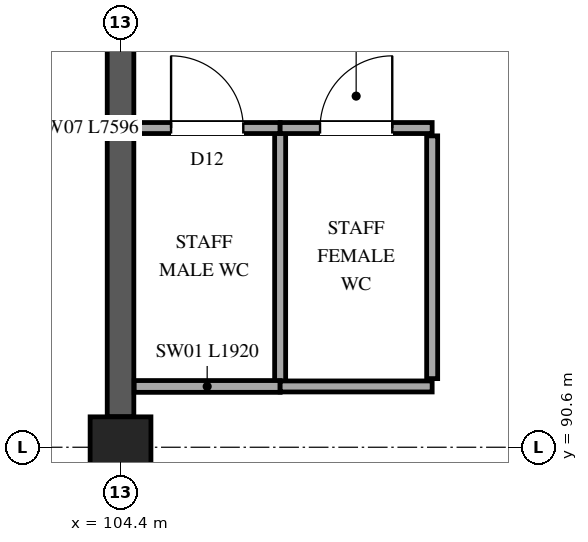
"""IFC4 building model, lengths in metres.
Left out: names, types, materials, properties, quantities, classifications, styles, units other than length and angle.
Written with IfcOpenShell. Run it as: python <this file> out.ifc"""

import sys

from ifc_helpers import new_model, si_unit, direction, frame, frame_2d, origin, origin_2d, place, context, subcontext, project, spatial, rectangle, extrude, element, fill, save


model = new_model("IFC4")
c1 = context("Model", 3, precision=1e-05, world=origin(), true_north=direction((0.0, 1.0)))
c2 = subcontext(c1, "Body", "Model", "MODEL_VIEW")
j1 = project(units=[si_unit("LENGTHUNIT", "METRE"), si_unit("PLANEANGLEUNIT", "RADIAN")], contexts=[c1])
p1 = place(None, origin())
s1 = spatial("IfcSite", under=j1, at=p1, CompositionType="ELEMENT")
p2 = place(p1, origin())
s2 = spatial("IfcBuilding", under=s1, at=p2, CompositionType="ELEMENT")
p3 = place(p2, frame((0.0, 0.0, 21.6)))
s3 = spatial("IfcBuildingStorey", under=s2, at=p3, CompositionType="ELEMENT", Elevation=21.6)
p4 = place(p3, frame((104.4, 90.6, 0.0), z_axis=(0.0, 0.0, 1.0), x_axis=(1.0, 0.0, 0.0)))
e1 = element("IfcColumn", 1, at=p4, inside=s3, PredefinedType="COLUMN", context=c2, shape_type="SweptSolid", body=[
    extrude(rectangle(XDim=0.8, YDim=0.8, at=origin_2d()), origin(), (0.0, 0.0, 1.0), 5.1),
])
p5 = place(p3, frame((104.4, 91.002, 0.0), z_axis=(0.0, 0.0, 1.0), x_axis=(0.0, 1.0, 0.0)))
e2 = element("IfcWall", 2, at=p5, inside=s3, PredefinedType="STANDARD", context=c2, shape_type="SweptSolid", body=[
    extrude(rectangle(XDim=7.596, YDim=0.35, at=frame_2d((3.798, 0.0))), origin(), (0.0, 0.0, 1.0), 4.79),
])
p6 = place(p3, frame((106.5, 94.8, 0.0), z_axis=(0.0, 0.0, 1.0), x_axis=(0.0, -1.0, 0.0)))
e3 = element("IfcWall", 3, at=p6, inside=s3, PredefinedType="PARTITIONING", context=c2, shape_type="SweptSolid", body=[
    extrude(rectangle(XDim=3.4, YDim=0.145, at=frame_2d((1.7, 0.0))), origin(), (0.0, 0.0, 1.0), 4.76),
])
p7 = place(p3, frame((104.58, 94.8, 0.0), z_axis=(0.0, 0.0, 1.0), x_axis=(1.0, 0.0, 0.0)))
e4 = element("IfcWall", 4, at=p7, inside=s3, PredefinedType="PARTITIONING", context=c2, shape_type="SweptSolid", body=[
    extrude(rectangle(XDim=1.92, YDim=0.145, at=frame_2d((0.96, 0.0))), origin(), (0.0, 0.0, 1.0), 4.275),
])
p8 = place(p7, frame((0.485, 0.0, 0.0)))
e5 = element("IfcOpeningElement", 5, at=p8, cuts=e4, PredefinedType="OPENING", context=c2, shape_type="SweptSolid", body=[
    extrude(rectangle(XDim=0.95, YDim=2.15, at=frame_2d((0.475, 1.075))), frame((0.0, 0.083, 0.0), z_axis=(0.0, -1.0, 0.0), x_axis=(1.0, 0.0, 0.0)), (0.0, 0.0, 1.0), 0.165),
])
p9 = place(p3, frame((106.5, 91.4, 0.0), z_axis=(0.0, 0.0, 1.0), x_axis=(-1.0, 0.0, 0.0)))
e6 = element("IfcWall", 6, at=p9, inside=s3, PredefinedType="MOVABLE", context=c2, shape_type="SweptSolid", body=[
    extrude(rectangle(XDim=1.92, YDim=0.155, at=frame_2d((0.96, 0.0))), origin(), (0.0, 0.0, 1.0), 4.275),
])
p10 = place(p3, frame((106.5, 94.8, 0.0), z_axis=(0.0, 0.0, 1.0), x_axis=(1.0, 0.0, 0.0)))
e7 = element("IfcWall", 7, at=p10, inside=s3, PredefinedType="PARTITIONING", context=c2, shape_type="SweptSolid", body=[
    extrude(rectangle(XDim=2.0, YDim=0.145, at=frame_2d((1.0, 0.0))), origin(), (0.0, 0.0, 1.0), 4.76),
])
p11 = place(p10, frame((0.525, 0.0, 0.0)))
e8 = element("IfcOpeningElement", 8, at=p11, cuts=e7, PredefinedType="OPENING", context=c2, shape_type="SweptSolid", body=[
    extrude(rectangle(XDim=0.95, YDim=2.2, at=frame_2d((0.475, 1.1))), frame((0.0, 0.083, 0.0), z_axis=(0.0, -1.0, 0.0), x_axis=(1.0, 0.0, 0.0)), (0.0, 0.0, 1.0), 0.165),
])
p12 = place(p3, frame((108.5, 91.4, 0.0), z_axis=(0.0, 0.0, 1.0), x_axis=(-1.0, 0.0, 0.0)))
e9 = element("IfcWall", 9, at=p12, inside=s3, PredefinedType="PARTITIONING", context=c2, shape_type="SweptSolid", body=[
    extrude(rectangle(XDim=2.0, YDim=0.145, at=frame_2d((1.0, 0.0))), origin(), (0.0, 0.0, 1.0), 4.76),
])
p13 = place(p3, frame((108.5, 94.697, 0.0), z_axis=(0.0, 0.0, 1.0), x_axis=(0.0, -1.0, 0.0)))
e10 = element("IfcWall", 10, at=p13, inside=s3, PredefinedType="PARTITIONING", context=c2, shape_type="SweptSolid", body=[
    extrude(rectangle(XDim=3.194, YDim=0.145, at=frame_2d((1.597, 0.0))), origin(), (0.0, 0.0, 1.0), 4.76),
])
p14 = place(p8, origin())
e11 = element("IfcDoor", 11, at=p14, inside=s3, OperationType="SINGLE_SWING_LEFT", PredefinedType="DOOR", context=c2, shape_type="SweptSolid", body=[
    extrude(rectangle(XDim=0.95, YDim=2.15, at=frame_2d((0.475, 1.075))), frame((0.0, 0.025, 0.0), z_axis=(0.0, -1.0, 0.0), x_axis=(1.0, 0.0, 0.0)), (0.0, 0.0, 1.0), 0.05),
])
fill(e5, e11)
p15 = place(p11, origin())
e12 = element("IfcDoor", 12, at=p15, inside=s3, OperationType="SINGLE_SWING_RIGHT", PredefinedType="DOOR", context=c2, shape_type="SweptSolid", body=[
    extrude(rectangle(XDim=0.95, YDim=2.2, at=frame_2d((0.475, 1.1))), frame((0.0, 0.025, 0.0), z_axis=(0.0, -1.0, 0.0), x_axis=(1.0, 0.0, 0.0)), (0.0, 0.0, 1.0), 0.05),
])
fill(e8, e12)
save(model, sys.argv[1])
